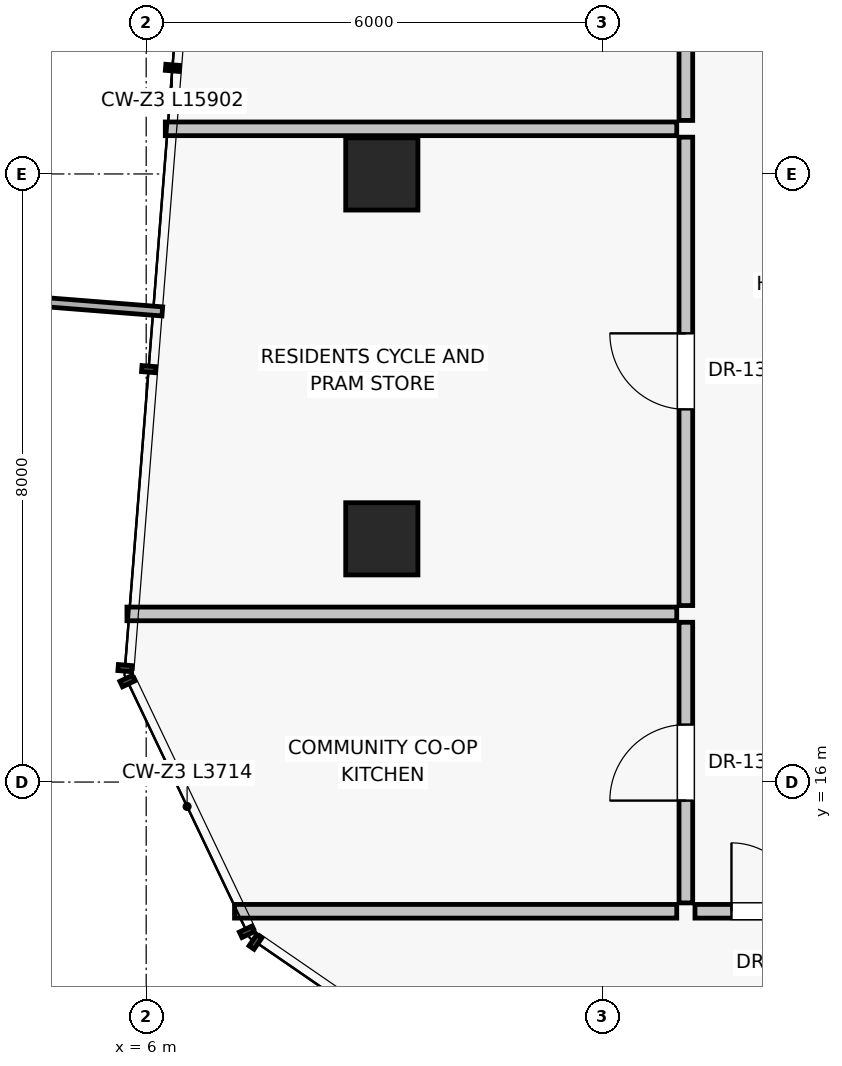
"""IFC4 building model, lengths in metres.
Left out: names, types, materials, properties, quantities, classifications, styles, units other than length and angle.
Written with IfcOpenShell. Run it as: python <this file> out.ifc"""

import sys

from ifc_helpers import new_model, si_unit, direction, frame, frame_2d, origin, origin_2d, place, context, subcontext, project, spatial, rectangle, extrude, source, transform, mapped, element, fill, save


model = new_model("IFC4")
c1 = context("Model", 3, precision=1e-05, world=origin(), true_north=direction((0.0, 1.0)))
c2 = subcontext(c1, "Body", "Model", "MODEL_VIEW")
j1 = project(units=[si_unit("LENGTHUNIT", "METRE"), si_unit("PLANEANGLEUNIT", "RADIAN")], contexts=[c1])
p1 = place(None, origin())
s1 = spatial("IfcSite", under=j1, at=p1, CompositionType="ELEMENT")
p2 = place(p1, origin())
s2 = spatial("IfcBuilding", under=s1, at=p2, CompositionType="ELEMENT")
p3 = place(p2, frame((0.0, 0.0, 222.15)))
s3 = spatial("IfcBuildingStorey", under=s2, at=p3, CompositionType="ELEMENT", Elevation=222.15)
for number, where, z_axis, x_axis in (
    (1, (9.1, 24.0, 0.0), (0.0, 0.0, 1.0), (1.0, 0.0, 0.0)),
    (2, (9.1, 19.2, 0.0), (0.0, 0.0, 1.0), (1.0, 0.0, 0.0)),
):
    element("IfcColumn", number, at=place(p3, frame(where, z_axis=z_axis, x_axis=x_axis)), inside=s3, PredefinedType="COLUMN", context=c2, shape_type="SweptSolid", body=[
        extrude(rectangle(XDim=0.95, YDim=0.95, at=origin_2d()), origin(), (0.0, 0.0, 1.0), 3.25),
    ])
p4 = place(p3, frame((12.98, 14.3, 0.0), z_axis=(0.0, 0.0, 1.0), x_axis=(-1.0, 0.0, 0.0)))
e3 = element("IfcWall", 3, at=p4, inside=s3, PredefinedType="PARTITIONING", context=c2, shape_type="SweptSolid", body=[
    extrude(rectangle(XDim=5.818, YDim=0.18, at=frame_2d((2.909, 0.0))), origin(), (0.0, 0.0, 1.0), 2.93),
])
p5 = place(p3, frame((13.1, 14.41, 0.0), z_axis=(0.0, 0.0, 1.0), x_axis=(0.0, 1.0, 0.0)))
e4 = element("IfcWall", 4, at=p5, inside=s3, PredefinedType="PARTITIONING", context=c2, shape_type="SweptSolid", body=[
    extrude(rectangle(XDim=3.692, YDim=0.18, at=frame_2d((1.846, 0.0))), origin(), (0.0, 0.0, 1.0), 2.577),
])
p6 = place(p5, frame((1.346, 0.0, 0.0)))
e5 = element("IfcOpeningElement", 5, at=p6, cuts=e4, PredefinedType="OPENING", context=c2, shape_type="SweptSolid", body=[
    extrude(rectangle(XDim=1.0, YDim=2.01, at=frame_2d((0.5, 1.005))), frame((0.0, 0.1, 0.0), z_axis=(0.0, -1.0, 0.0), x_axis=(1.0, 0.0, 0.0)), (0.0, 0.0, 1.0), 0.2),
])
p7 = place(p3, frame((13.1, 18.322, 0.0), z_axis=(0.0, 0.0, 1.0), x_axis=(0.0, 1.0, 0.0)))
e6 = element("IfcWall", 6, at=p7, inside=s3, PredefinedType="PARTITIONING", context=c2, shape_type="SweptSolid", body=[
    extrude(rectangle(XDim=6.162, YDim=0.18, at=frame_2d((3.081, 0.0))), origin(), (0.0, 0.0, 1.0), 2.577),
])
p8 = place(p7, frame((2.581, 0.0, 0.0)))
e7 = element("IfcOpeningElement", 7, at=p8, cuts=e6, PredefinedType="OPENING", context=c2, shape_type="SweptSolid", body=[
    extrude(rectangle(XDim=1.0, YDim=2.01, at=frame_2d((0.5, 1.005))), frame((0.0, 0.1, 0.0), z_axis=(0.0, -1.0, 0.0), x_axis=(1.0, 0.0, 0.0)), (0.0, 0.0, 1.0), 0.2),
])
p9 = place(p3, frame((12.98, 18.212, 0.0), z_axis=(0.0, 0.0, 1.0), x_axis=(-1.0, 0.0, 0.0)))
e8 = element("IfcWall", 8, at=p9, inside=s3, PredefinedType="PARTITIONING", context=c2, shape_type="SweptSolid", body=[
    extrude(rectangle(XDim=7.233, YDim=0.18, at=frame_2d((3.617, 0.0))), origin(), (0.0, 0.0, 1.0), 2.384),
])
p10 = place(p3, frame((12.98, 24.594, 0.0), z_axis=(0.0, 0.0, 1.0), x_axis=(-1.0, 0.0, 0.0)))
e9 = element("IfcWall", 9, at=p10, inside=s3, PredefinedType="PARTITIONING", context=c2, shape_type="SweptSolid", body=[
    extrude(rectangle(XDim=6.729, YDim=0.18, at=frame_2d((3.364, 0.0))), origin(), (0.0, 0.0, 1.0), 2.93),
])
p11 = place(p3, frame((13.1, 24.704, 0.0), z_axis=(0.0, 0.0, 1.0), x_axis=(0.0, 1.0, 0.0)))
e10 = element("IfcWall", 10, at=p11, inside=s3, PredefinedType="PARTITIONING", context=c2, shape_type="SweptSolid", body=[
    extrude(rectangle(XDim=3.164, YDim=0.18, at=frame_2d((1.582, 0.0))), origin(), (0.0, 0.0, 1.0), 2.577),
])
p12 = place(p11, frame((1.082, 0.0, 0.0)))
e11 = element("IfcOpeningElement", 11, at=p12, cuts=e10, PredefinedType="OPENING", context=c2, shape_type="SweptSolid", body=[
    extrude(rectangle(XDim=1.0, YDim=2.01, at=frame_2d((0.5, 1.005))), frame((0.0, 0.1, 0.0), z_axis=(0.0, -1.0, 0.0), x_axis=(1.0, 0.0, 0.0)), (0.0, 0.0, 1.0), 0.2),
])
p13 = place(p3, frame((13.22, 14.3, 0.0), z_axis=(0.0, 0.0, 1.0), x_axis=(1.0, 0.0, 0.0)))
e12 = element("IfcWall", 12, at=p13, inside=s3, PredefinedType="PARTITIONING", context=c2, shape_type="SweptSolid", body=[
    extrude(rectangle(XDim=1.86, YDim=0.18, at=frame_2d((0.93, 0.0))), origin(), (0.0, 0.0, 1.0), 2.93),
])
p14 = place(p13, frame((0.48, 0.0, 0.0)))
e13 = element("IfcOpeningElement", 13, at=p14, cuts=e12, PredefinedType="OPENING", context=c2, shape_type="SweptSolid", body=[
    extrude(rectangle(XDim=0.9, YDim=2.01, at=frame_2d((0.45, 1.005))), frame((0.0, 0.1, 0.0), z_axis=(0.0, -1.0, 0.0), x_axis=(1.0, 0.0, 0.0)), (0.0, 0.0, 1.0), 0.2),
])
m1 = source(origin(), c2, "Body", "SweptSolid", [
    extrude(rectangle(XDim=1.0, YDim=2.01, at=frame_2d((0.5, 1.005))), frame((0.0, 0.025, 0.0), z_axis=(0.0, -1.0, 0.0), x_axis=(1.0, 0.0, 0.0)), (0.0, 0.0, 1.0), 0.05),
])
p15 = place(p6, origin())
e14 = element("IfcDoor", 14, at=p15, inside=s3, OperationType="SINGLE_SWING_LEFT", PredefinedType="DOOR", context=c2, shape_type="MappedRepresentation", body=[
    mapped(m1, transform((0.0, 0.0, 0.0), scale=1.0)),
])
fill(e5, e14)
p16 = place(p8, origin())
e15 = element("IfcDoor", 15, at=p16, inside=s3, OperationType="SINGLE_SWING_RIGHT", PredefinedType="DOOR", context=c2, shape_type="MappedRepresentation", body=[
    mapped(m1, transform((0.0, 0.0, 0.0), scale=1.0)),
])
fill(e7, e15)
m2 = source(origin(), c2, "Body", "SweptSolid", [
    extrude(rectangle(XDim=0.9, YDim=2.01, at=frame_2d((0.45, 1.005))), frame((0.0, 0.025, 0.0), z_axis=(0.0, -1.0, 0.0), x_axis=(1.0, 0.0, 0.0)), (0.0, 0.0, 1.0), 0.05),
])
p17 = place(p14, origin())
e16 = element("IfcDoor", 16, at=p17, inside=s3, OperationType="SINGLE_SWING_LEFT", PredefinedType="DOOR", context=c2, shape_type="MappedRepresentation", body=[
    mapped(m2, transform((0.0, 0.0, 0.0), scale=1.0)),
])
fill(e13, e16)
save(model, sys.argv[1])
